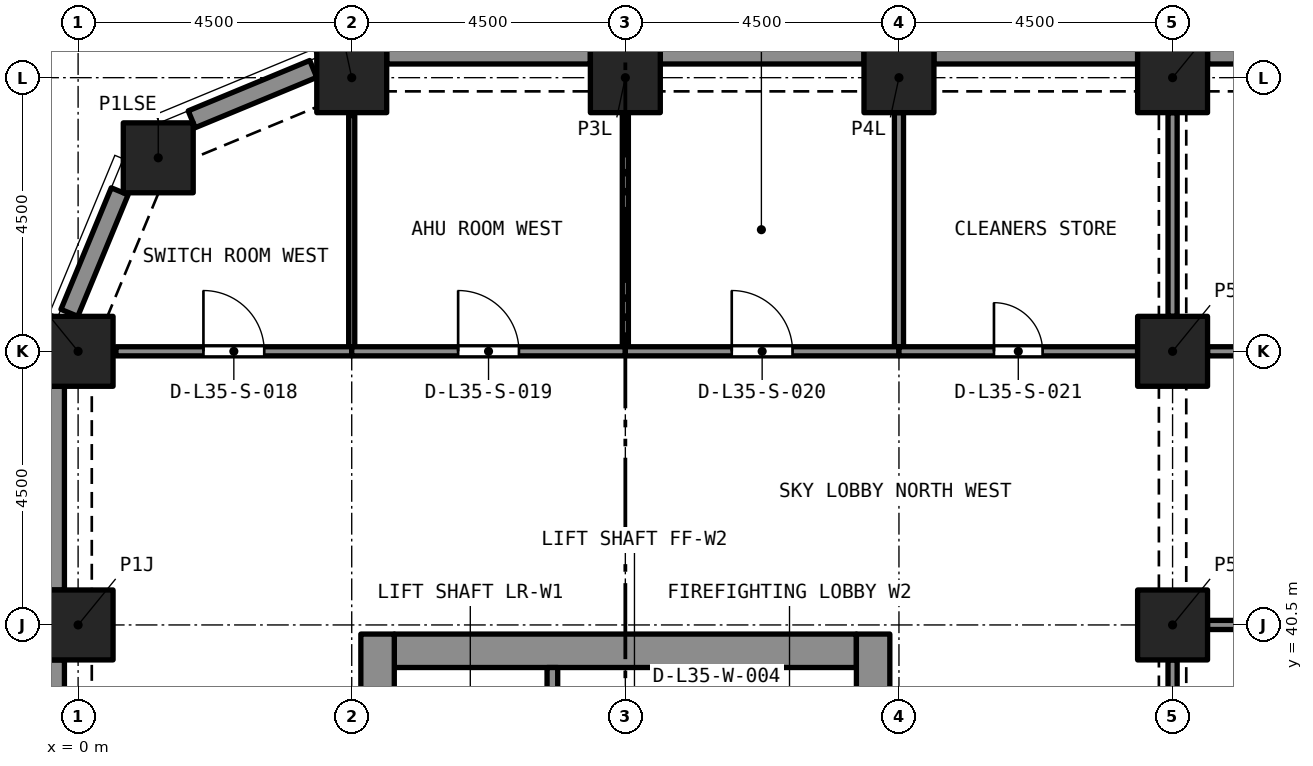
"""IFC4 building model, lengths in metres.
Left out: names, types, materials, properties, quantities, classifications, styles, units other than length and angle.
Written with IfcOpenShell. Run it as: python <this file> out.ifc"""

import sys

from ifc_helpers import new_model, si_unit, direction, frame, frame_2d, origin, origin_2d, place, context, subcontext, project, spatial, rectangle, extrude, element, fill, save


model = new_model("IFC4")
c1 = context("Model", 3, precision=1e-05, world=origin(), true_north=direction((0.0, 1.0)))
c2 = subcontext(c1, "Body", "Model", "MODEL_VIEW")
j1 = project(units=[si_unit("LENGTHUNIT", "METRE"), si_unit("PLANEANGLEUNIT", "RADIAN")], contexts=[c1])
p1 = place(None, origin())
s1 = spatial("IfcSite", under=j1, at=p1, CompositionType="ELEMENT")
p2 = place(p1, origin())
s2 = spatial("IfcBuilding", under=s1, at=p2, CompositionType="ELEMENT")
p3 = place(p2, frame((0.0, 0.0, 124.8)))
s3 = spatial("IfcBuildingStorey", under=s2, at=p3, CompositionType="ELEMENT", Elevation=124.8)
for number, where, z_axis, x_axis in (
    (1, (0.0, 40.5, 0.0), (0.0, 0.0, 1.0), (1.0, 0.0, 0.0)),
    (2, (18.0, 40.5, 0.0), (0.0, 0.0, 1.0), (1.0, 0.0, 0.0)),
    (3, (0.0, 45.0, 0.0), (0.0, 0.0, 1.0), (1.0, 0.0, 0.0)),
    (4, (18.0, 45.0, 0.0), (0.0, 0.0, 1.0), (1.0, 0.0, 0.0)),
    (5, (1.318, 48.182, 0.0), (0.0, 0.0, 1.0), (1.0, 0.0, 0.0)),
    (6, (4.5, 49.5, 0.0), (0.0, 0.0, 1.0), (1.0, 0.0, 0.0)),
    (7, (9.0, 49.5, 0.0), (0.0, 0.0, 1.0), (1.0, 0.0, 0.0)),
    (8, (13.5, 49.5, 0.0), (0.0, 0.0, 1.0), (1.0, 0.0, 0.0)),
    (9, (18.0, 49.5, 0.0), (0.0, 0.0, 1.0), (1.0, 0.0, 0.0)),
):
    element("IfcColumn", number, at=place(p3, frame(where, z_axis=z_axis, x_axis=x_axis)), inside=s3, PredefinedType="COLUMN", context=c2, shape_type="SweptSolid", body=[
        extrude(rectangle(XDim=1.15, YDim=1.15, at=origin_2d()), origin(), (0.0, 0.0, 1.0), 5.4),
    ])
p4 = place(p3, frame((5.2, 40.075, 0.0), z_axis=(0.0, 0.0, 1.0), x_axis=(1.0, 0.0, 0.0)))
e10 = element("IfcWall", 10, at=p4, inside=s3, PredefinedType="SOLIDWALL", context=c2, shape_type="SweptSolid", body=[
    extrude(rectangle(XDim=7.6, YDim=0.55, at=frame_2d((3.8, 0.0))), origin(), (0.0, 0.0, 1.0), 5.4),
])
p5 = place(p3, frame((4.925, 27.15, 0.0), z_axis=(0.0, 0.0, 1.0), x_axis=(0.0, 1.0, 0.0)))
e11 = element("IfcWall", 11, at=p5, inside=s3, PredefinedType="SOLIDWALL", context=c2, shape_type="SweptSolid", body=[
    extrude(rectangle(XDim=13.2, YDim=0.55, at=frame_2d((6.6, 0.0))), origin(), (0.0, 0.0, 1.0), 5.4),
])
p6 = place(p5, frame((8.8, 0.0, 0.0)))
e12 = element("IfcOpeningElement", 12, at=p6, cuts=e11, PredefinedType="OPENING", context=c2, shape_type="SweptSolid", body=[
    extrude(rectangle(XDim=1.2, YDim=2.1, at=frame_2d((0.6, 1.05))), frame((0.0, 0.285, 0.0), z_axis=(0.0, -1.0, 0.0), x_axis=(1.0, 0.0, 0.0)), (0.0, 0.0, 1.0), 0.57),
])
p7 = place(p3, frame((13.075, 27.15, 0.0), z_axis=(0.0, 0.0, 1.0), x_axis=(0.0, 1.0, 0.0)))
e13 = element("IfcWall", 13, at=p7, inside=s3, PredefinedType="SOLIDWALL", context=c2, shape_type="SweptSolid", body=[
    extrude(rectangle(XDim=13.2, YDim=0.55, at=frame_2d((6.6, 0.0))), origin(), (0.0, 0.0, 1.0), 5.4),
])
p8 = place(p7, frame((10.95, 0.0, 0.0)))
e14 = element("IfcOpeningElement", 14, at=p8, cuts=e13, PredefinedType="OPENING", context=c2, shape_type="SweptSolid", body=[
    extrude(rectangle(XDim=1.1, YDim=2.1, at=frame_2d((0.55, 1.05))), frame((0.0, 0.285, 0.0), z_axis=(0.0, -1.0, 0.0), x_axis=(1.0, 0.0, 0.0)), (0.0, 0.0, 1.0), 0.57),
])
p9 = place(p7, frame((8.8, 0.0, 0.0)))
e15 = element("IfcOpeningElement", 15, at=p9, cuts=e13, PredefinedType="OPENING", context=c2, shape_type="SweptSolid", body=[
    extrude(rectangle(XDim=1.2, YDim=2.1, at=frame_2d((0.6, 1.05))), frame((0.0, 0.285, 0.0), z_axis=(0.0, -1.0, 0.0), x_axis=(1.0, 0.0, 0.0)), (0.0, 0.0, 1.0), 0.57),
])
for number, where, z_axis, x_axis in (
    (16, (18.575, 49.875, 0.0), (0.0, 0.0, 1.0), (1.0, 0.0, 0.0)),
    (17, (14.075, 49.875, 0.0), (0.0, 0.0, 1.0), (1.0, 0.0, 0.0)),
    (18, (9.575, 49.875, 0.0), (0.0, 0.0, 1.0), (1.0, 0.0, 0.0)),
    (19, (5.075, 49.875, 0.0), (0.0, 0.0, 1.0), (1.0, 0.0, 0.0)),
):
    element("IfcWall", number, at=place(p3, frame(where, z_axis=z_axis, x_axis=x_axis)), inside=s3, PredefinedType="SOLIDWALL", context=c2, shape_type="SweptSolid", body=[
        extrude(rectangle(XDim=3.35, YDim=0.3, at=frame_2d((1.675, 0.0))), origin(), (0.0, 0.0, 1.0), 5.4),
    ])
for number, where, z_axis, x_axis in (
    (20, (1.869, 48.816, 0.0), (0.0, 0.0, 1.0), (0.924, 0.383, 0.0)),
    (21, (-0.144, 45.632, 0.0), (0.0, 0.0, 1.0), (0.383, 0.924, 0.0)),
):
    element("IfcWall", number, at=place(p3, frame(where, z_axis=z_axis, x_axis=x_axis)), inside=s3, PredefinedType="SOLIDWALL", context=c2, shape_type="SweptSolid", body=[
        extrude(rectangle(XDim=2.164, YDim=0.3, at=frame_2d((1.082, 0.0))), origin(), (0.0, 0.0, 1.0), 5.4),
    ])
for number, where, z_axis, x_axis in (
    (22, (-0.375, 41.075, 0.0), (0.0, 0.0, 1.0), (0.0, 1.0, 0.0)),
    (23, (-0.375, 36.575, 0.0), (0.0, 0.0, 1.0), (0.0, 1.0, 0.0)),
):
    element("IfcWall", number, at=place(p3, frame(where, z_axis=z_axis, x_axis=x_axis)), inside=s3, PredefinedType="SOLIDWALL", context=c2, shape_type="SweptSolid", body=[
        extrude(rectangle(XDim=3.35, YDim=0.3, at=frame_2d((1.675, 0.0))), origin(), (0.0, 0.0, 1.0), 5.4),
    ])
p10 = place(p3, frame((7.8, 37.5, 0.0), z_axis=(0.0, 0.0, 1.0), x_axis=(0.0, 1.0, 0.0)))
e24 = element("IfcWall", 24, at=p10, inside=s3, PredefinedType="SOLIDWALL", context=c2, shape_type="SweptSolid", body=[
    extrude(rectangle(XDim=2.3, YDim=0.175, at=frame_2d((1.15, 0.0))), origin(), (0.0, 0.0, 1.0), 5.1),
])
p11 = place(p3, frame((10.5, 37.5, 0.0), z_axis=(0.0, 0.0, 1.0), x_axis=(0.0, 1.0, 0.0)))
e25 = element("IfcWall", 25, at=p11, inside=s3, PredefinedType="SOLIDWALL", context=c2, shape_type="SweptSolid", body=[
    extrude(rectangle(XDim=2.3, YDim=0.175, at=frame_2d((1.15, 0.0))), origin(), (0.0, 0.0, 1.0), 5.1),
])
p12 = place(p11, frame((0.65, 0.0, 0.0)))
e26 = element("IfcOpeningElement", 26, at=p12, cuts=e25, PredefinedType="OPENING", context=c2, shape_type="SweptSolid", body=[
    extrude(rectangle(XDim=1.0, YDim=2.1, at=frame_2d((0.5, 1.05))), frame((0.0, 0.097, 0.0), z_axis=(0.0, -1.0, 0.0), x_axis=(1.0, 0.0, 0.0)), (0.0, 0.0, 1.0), 0.195),
])
p13 = place(p3, frame((30.925, 40.5, 0.0), z_axis=(0.0, 0.0, 1.0), x_axis=(-1.0, 0.0, 0.0)))
e27 = element("IfcWall", 27, at=p13, inside=s3, PredefinedType="PARTITIONING", context=c2, shape_type="SweptSolid", body=[
    extrude(rectangle(XDim=12.35, YDim=0.15, at=frame_2d((6.175, 0.0))), origin(), (0.0, 0.0, 1.0), 4.95),
])
p14 = place(p13, frame((5.425, 0.0, 0.0)))
e28 = element("IfcOpeningElement", 28, at=p14, cuts=e27, PredefinedType="OPENING", context=c2, shape_type="SweptSolid", body=[
    extrude(rectangle(XDim=1.5, YDim=2.4, at=frame_2d((0.75, 1.2))), frame((0.0, 0.085, 0.0), z_axis=(0.0, -1.0, 0.0), x_axis=(1.0, 0.0, 0.0)), (0.0, 0.0, 1.0), 0.17),
])
p15 = place(p3, frame((18.0, 36.575, 0.0), z_axis=(0.0, 0.0, 1.0), x_axis=(0.0, 1.0, 0.0)))
e29 = element("IfcWall", 29, at=p15, inside=s3, PredefinedType="PARTITIONING", context=c2, shape_type="SweptSolid", body=[
    extrude(rectangle(XDim=3.35, YDim=0.15, at=frame_2d((1.675, 0.0))), origin(), (0.0, 0.0, 1.0), 4.58),
])
p16 = place(p3, frame((18.575, 45.0, 0.0), z_axis=(0.0, 0.0, 1.0), x_axis=(1.0, 0.0, 0.0)))
e30 = element("IfcWall", 30, at=p16, inside=s3, PredefinedType="PARTITIONING", context=c2, shape_type="SweptSolid", body=[
    extrude(rectangle(XDim=8.425, YDim=0.15, at=frame_2d((4.212, 0.0))), origin(), (0.0, 0.0, 1.0), 4.95),
])
p17 = place(p16, frame((3.462, 0.0, 0.0)))
e31 = element("IfcOpeningElement", 31, at=p17, cuts=e30, PredefinedType="OPENING", context=c2, shape_type="SweptSolid", body=[
    extrude(rectangle(XDim=1.5, YDim=2.4, at=frame_2d((0.75, 1.2))), frame((0.0, 0.085, 0.0), z_axis=(0.0, -1.0, 0.0), x_axis=(1.0, 0.0, 0.0)), (0.0, 0.0, 1.0), 0.17),
])
p18 = place(p3, frame((18.0, 45.575, 0.0), z_axis=(0.0, 0.0, 1.0), x_axis=(0.0, 1.0, 0.0)))
e32 = element("IfcWall", 32, at=p18, inside=s3, PredefinedType="PARTITIONING", context=c2, shape_type="SweptSolid", body=[
    extrude(rectangle(XDim=3.35, YDim=0.15, at=frame_2d((1.675, 0.0))), origin(), (0.0, 0.0, 1.0), 4.58),
])
p19 = place(p3, frame((4.5, 45.075, 0.0), z_axis=(0.0, 0.0, 1.0), x_axis=(0.0, 1.0, 0.0)))
e33 = element("IfcWall", 33, at=p19, inside=s3, PredefinedType="PARTITIONING", context=c2, shape_type="SweptSolid", body=[
    extrude(rectangle(XDim=3.803, YDim=0.1, at=frame_2d((1.901, 0.0))), origin(), (0.0, 0.0, 1.0), 5.1),
])
p20 = place(p3, frame((0.622, 45.0, 0.0), z_axis=(0.0, 0.0, 1.0), x_axis=(1.0, 0.0, 0.0)))
e34 = element("IfcWall", 34, at=p20, inside=s3, PredefinedType="PARTITIONING", context=c2, shape_type="SweptSolid", body=[
    extrude(rectangle(XDim=3.878, YDim=0.15, at=frame_2d((1.939, 0.0))), origin(), (0.0, 0.0, 1.0), 5.1),
])
p21 = place(p20, frame((1.439, 0.0, 0.0)))
e35 = element("IfcOpeningElement", 35, at=p21, cuts=e34, PredefinedType="OPENING", context=c2, shape_type="SweptSolid", body=[
    extrude(rectangle(XDim=1.0, YDim=2.1, at=frame_2d((0.5, 1.05))), frame((0.0, 0.085, 0.0), z_axis=(0.0, -1.0, 0.0), x_axis=(1.0, 0.0, 0.0)), (0.0, 0.0, 1.0), 0.17),
])
p22 = place(p3, frame((9.0, 45.075, 0.0), z_axis=(0.0, 0.0, 1.0), x_axis=(0.0, 1.0, 0.0)))
e36 = element("IfcWall", 36, at=p22, inside=s3, PredefinedType="PARTITIONING", context=c2, shape_type="SweptSolid", body=[
    extrude(rectangle(XDim=3.85, YDim=0.1, at=frame_2d((1.925, 0.0))), origin(), (0.0, 0.0, 1.0), 5.1),
])
p23 = place(p3, frame((4.5, 45.0, 0.0), z_axis=(0.0, 0.0, 1.0), x_axis=(1.0, 0.0, 0.0)))
e37 = element("IfcWall", 37, at=p23, inside=s3, PredefinedType="PARTITIONING", context=c2, shape_type="SweptSolid", body=[
    extrude(rectangle(XDim=4.5, YDim=0.15, at=frame_2d((2.25, 0.0))), origin(), (0.0, 0.0, 1.0), 5.1),
])
p24 = place(p23, frame((1.75, 0.0, 0.0)))
e38 = element("IfcOpeningElement", 38, at=p24, cuts=e37, PredefinedType="OPENING", context=c2, shape_type="SweptSolid", body=[
    extrude(rectangle(XDim=1.0, YDim=2.1, at=frame_2d((0.5, 1.05))), frame((0.0, 0.085, 0.0), z_axis=(0.0, -1.0, 0.0), x_axis=(1.0, 0.0, 0.0)), (0.0, 0.0, 1.0), 0.17),
])
p25 = place(p3, frame((13.5, 45.075, 0.0), z_axis=(0.0, 0.0, 1.0), x_axis=(0.0, 1.0, 0.0)))
e39 = element("IfcWall", 39, at=p25, inside=s3, PredefinedType="PARTITIONING", context=c2, shape_type="SweptSolid", body=[
    extrude(rectangle(XDim=3.85, YDim=0.15, at=frame_2d((1.925, 0.0))), origin(), (0.0, 0.0, 1.0), 5.1),
])
p26 = place(p3, frame((9.0, 45.0, 0.0), z_axis=(0.0, 0.0, 1.0), x_axis=(1.0, 0.0, 0.0)))
e40 = element("IfcWall", 40, at=p26, inside=s3, PredefinedType="PARTITIONING", context=c2, shape_type="SweptSolid", body=[
    extrude(rectangle(XDim=4.5, YDim=0.15, at=frame_2d((2.25, 0.0))), origin(), (0.0, 0.0, 1.0), 5.1),
])
p27 = place(p26, frame((1.75, 0.0, 0.0)))
e41 = element("IfcOpeningElement", 41, at=p27, cuts=e40, PredefinedType="OPENING", context=c2, shape_type="SweptSolid", body=[
    extrude(rectangle(XDim=1.0, YDim=2.1, at=frame_2d((0.5, 1.05))), frame((0.0, 0.085, 0.0), z_axis=(0.0, -1.0, 0.0), x_axis=(1.0, 0.0, 0.0)), (0.0, 0.0, 1.0), 0.17),
])
p28 = place(p3, frame((13.5, 45.0, 0.0), z_axis=(0.0, 0.0, 1.0), x_axis=(1.0, 0.0, 0.0)))
e42 = element("IfcWall", 42, at=p28, inside=s3, PredefinedType="PARTITIONING", context=c2, shape_type="SweptSolid", body=[
    extrude(rectangle(XDim=3.925, YDim=0.15, at=frame_2d((1.962, 0.0))), origin(), (0.0, 0.0, 1.0), 5.1),
])
p29 = place(p28, frame((1.562, 0.0, 0.0)))
e43 = element("IfcOpeningElement", 43, at=p29, cuts=e42, PredefinedType="OPENING", context=c2, shape_type="SweptSolid", body=[
    extrude(rectangle(XDim=0.8, YDim=2.1, at=frame_2d((0.4, 1.05))), frame((0.0, 0.085, 0.0), z_axis=(0.0, -1.0, 0.0), x_axis=(1.0, 0.0, 0.0)), (0.0, 0.0, 1.0), 0.17),
])
p30 = place(p21, origin())
e44 = element("IfcDoor", 44, at=p30, inside=s3, OperationType="SINGLE_SWING_RIGHT", PredefinedType="DOOR", context=c2, shape_type="SweptSolid", body=[
    extrude(rectangle(XDim=1.0, YDim=2.1, at=frame_2d((0.5, 1.05))), frame((0.0, 0.025, 0.0), z_axis=(0.0, -1.0, 0.0), x_axis=(1.0, 0.0, 0.0)), (0.0, 0.0, 1.0), 0.05),
])
fill(e35, e44)
p31 = place(p24, origin())
e45 = element("IfcDoor", 45, at=p31, inside=s3, OperationType="SINGLE_SWING_RIGHT", PredefinedType="DOOR", context=c2, shape_type="SweptSolid", body=[
    extrude(rectangle(XDim=1.0, YDim=2.1, at=frame_2d((0.5, 1.05))), frame((0.0, 0.025, 0.0), z_axis=(0.0, -1.0, 0.0), x_axis=(1.0, 0.0, 0.0)), (0.0, 0.0, 1.0), 0.05),
])
fill(e38, e45)
p32 = place(p27, origin())
e46 = element("IfcDoor", 46, at=p32, inside=s3, OperationType="SINGLE_SWING_RIGHT", PredefinedType="DOOR", context=c2, shape_type="SweptSolid", body=[
    extrude(rectangle(XDim=1.0, YDim=2.1, at=frame_2d((0.5, 1.05))), frame((0.0, 0.025, 0.0), z_axis=(0.0, -1.0, 0.0), x_axis=(1.0, 0.0, 0.0)), (0.0, 0.0, 1.0), 0.05),
])
fill(e41, e46)
p33 = place(p29, origin())
e47 = element("IfcDoor", 47, at=p33, inside=s3, OperationType="SINGLE_SWING_RIGHT", PredefinedType="DOOR", context=c2, shape_type="SweptSolid", body=[
    extrude(rectangle(XDim=0.8, YDim=2.1, at=frame_2d((0.4, 1.05))), frame((0.0, 0.025, 0.0), z_axis=(0.0, -1.0, 0.0), x_axis=(1.0, 0.0, 0.0)), (0.0, 0.0, 1.0), 0.05),
])
fill(e43, e47)
save(model, sys.argv[1])
